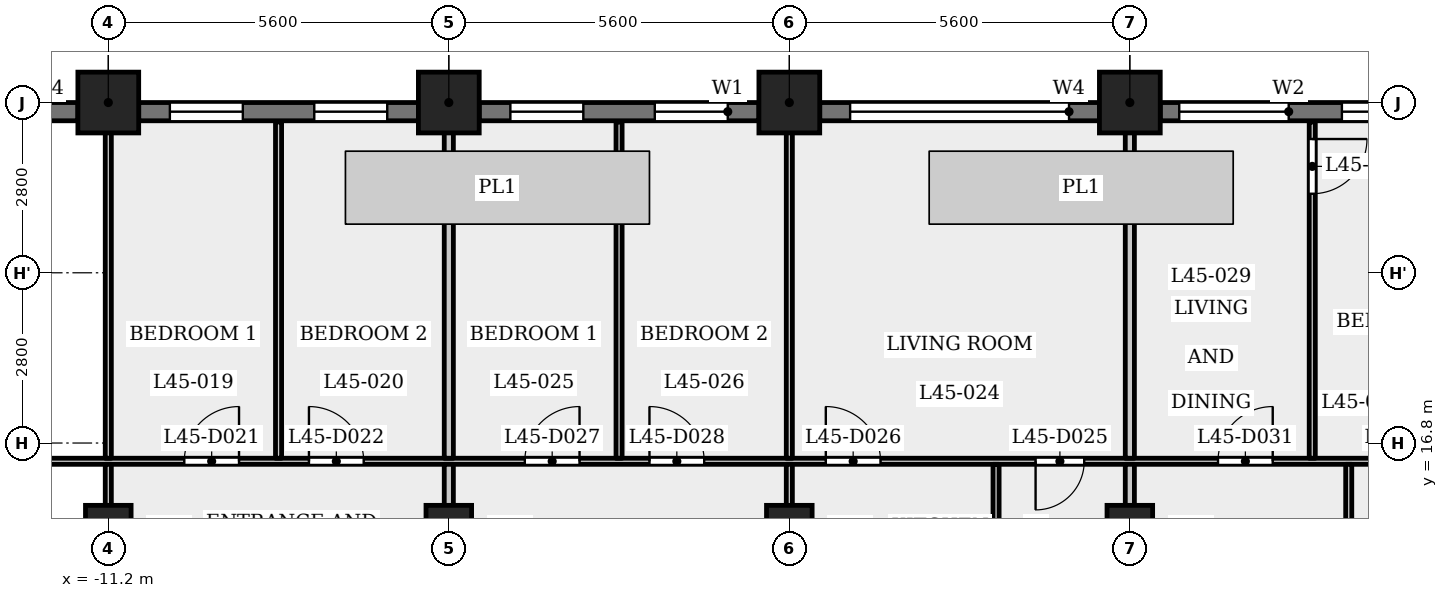
"""IFC4 building model, lengths in metres.
Left out: names, types, materials, properties, quantities, classifications, styles, units other than length and angle.
Written with IfcOpenShell. Run it as: python <this file> out.ifc"""

import sys

from ifc_helpers import new_model, si_unit, direction, frame, frame_2d, origin, origin_2d, place, context, subcontext, project, spatial, rectangle, extrude, element, fill, save


model = new_model("IFC4")
c1 = context("Model", 3, precision=1e-05, world=origin(), true_north=direction((0.0, 1.0)))
c2 = subcontext(c1, "Body", "Model", "MODEL_VIEW")
j1 = project(units=[si_unit("LENGTHUNIT", "METRE"), si_unit("PLANEANGLEUNIT", "RADIAN")], contexts=[c1])
p1 = place(None, origin())
s1 = spatial("IfcSite", under=j1, at=p1, CompositionType="ELEMENT")
p2 = place(p1, origin())
s2 = spatial("IfcBuilding", under=s1, at=p2, CompositionType="ELEMENT")
p3 = place(p2, frame((0.0, 0.0, 174.6)))
s3 = spatial("IfcBuildingStorey", under=s2, at=p3, CompositionType="ELEMENT", Elevation=174.6)
for number, where, z_axis, x_axis in (
    (1, (5.6, 22.4, 0.0), (0.0, 0.0, 1.0), (1.0, 0.0, 0.0)),
    (2, (0.0, 22.4, 0.0), (0.0, 0.0, 1.0), (1.0, 0.0, 0.0)),
    (3, (-5.6, 22.4, 0.0), (0.0, 0.0, 1.0), (1.0, 0.0, 0.0)),
    (4, (-11.2, 22.4, 0.0), (0.0, 0.0, 1.0), (1.0, 0.0, 0.0)),
):
    element("IfcColumn", number, at=place(p3, frame(where, z_axis=z_axis, x_axis=x_axis)), inside=s3, PredefinedType="COLUMN", context=c2, shape_type="SweptSolid", body=[
        extrude(rectangle(XDim=1.0, YDim=1.0, at=origin_2d()), origin(), (0.0, 0.0, 1.0), 3.5),
    ])
for number, where, z_axis, x_axis in (
    (5, (-11.2, 15.4, 0.0), (0.0, 0.0, 1.0), (1.0, 0.0, 0.0)),
    (6, (-5.6, 15.4, 0.0), (0.0, 0.0, 1.0), (1.0, 0.0, 0.0)),
    (7, (0.0, 15.4, 0.0), (0.0, 0.0, 1.0), (1.0, 0.0, 0.0)),
    (8, (5.6, 15.4, 0.0), (0.0, 0.0, 1.0), (1.0, 0.0, 0.0)),
):
    element("IfcColumn", number, at=place(p3, frame(where, z_axis=z_axis, x_axis=x_axis)), inside=s3, PredefinedType="COLUMN", context=c2, shape_type="SweptSolid", body=[
        extrude(rectangle(XDim=0.75, YDim=0.75, at=origin_2d()), origin(), (0.0, 0.0, 1.0), 3.5),
    ])
p4 = place(p3, frame((10.7, 22.25, 0.0), z_axis=(0.0, 0.0, 1.0), x_axis=(-1.0, 0.0, 0.0)))
e9 = element("IfcWall", 9, at=p4, inside=s3, PredefinedType="SOLIDWALL", context=c2, shape_type="SweptSolid", body=[
    extrude(rectangle(XDim=4.6, YDim=0.3, at=frame_2d((2.3, 0.0))), origin(), (0.0, 0.0, 1.0), 2.4),
])
p5 = place(p4, frame((0.413, 0.0, 0.6)))
e10 = element("IfcOpeningElement", 10, at=p5, cuts=e9, PredefinedType="OPENING", context=c2, shape_type="SweptSolid", body=[
    extrude(rectangle(XDim=1.2, YDim=1.55, at=frame_2d((0.6, 0.775))), frame((0.0, 0.16, 0.0), z_axis=(0.0, -1.0, 0.0), x_axis=(1.0, 0.0, 0.0)), (0.0, 0.0, 1.0), 0.32),
])
p6 = place(p4, frame((2.488, 0.0, 0.9)))
e11 = element("IfcOpeningElement", 11, at=p6, cuts=e9, PredefinedType="OPENING", context=c2, shape_type="SweptSolid", body=[
    extrude(rectangle(XDim=1.8, YDim=1.25, at=frame_2d((0.9, 0.625))), frame((0.0, 0.16, 0.0), z_axis=(0.0, -1.0, 0.0), x_axis=(1.0, 0.0, 0.0)), (0.0, 0.0, 1.0), 0.32),
])
p7 = place(p3, frame((5.1, 22.25, 0.0), z_axis=(0.0, 0.0, 1.0), x_axis=(-1.0, 0.0, 0.0)))
e12 = element("IfcWall", 12, at=p7, inside=s3, PredefinedType="SOLIDWALL", context=c2, shape_type="SweptSolid", body=[
    extrude(rectangle(XDim=4.6, YDim=0.3, at=frame_2d((2.3, 0.0))), origin(), (0.0, 0.0, 1.0), 2.4),
])
p8 = place(p7, frame((0.5, 0.0, 1.2)))
e13 = element("IfcOpeningElement", 13, at=p8, cuts=e12, PredefinedType="OPENING", context=c2, shape_type="SweptSolid", body=[
    extrude(rectangle(XDim=3.6, YDim=0.95, at=frame_2d((1.8, 0.475))), frame((0.0, 0.16, 0.0), z_axis=(0.0, -1.0, 0.0), x_axis=(1.0, 0.0, 0.0)), (0.0, 0.0, 1.0), 0.32),
])
p9 = place(p3, frame((-0.5, 22.25, 0.0), z_axis=(0.0, 0.0, 1.0), x_axis=(-1.0, 0.0, 0.0)))
e14 = element("IfcWall", 14, at=p9, inside=s3, PredefinedType="SOLIDWALL", context=c2, shape_type="SweptSolid", body=[
    extrude(rectangle(XDim=4.6, YDim=0.3, at=frame_2d((2.3, 0.0))), origin(), (0.0, 0.0, 1.0), 2.4),
])
p10 = place(p9, frame((0.512, 0.0, 0.6)))
e15 = element("IfcOpeningElement", 15, at=p10, cuts=e14, PredefinedType="OPENING", context=c2, shape_type="SweptSolid", body=[
    extrude(rectangle(XDim=1.2, YDim=1.55, at=frame_2d((0.6, 0.775))), frame((0.0, 0.16, 0.0), z_axis=(0.0, -1.0, 0.0), x_axis=(1.0, 0.0, 0.0)), (0.0, 0.0, 1.0), 0.32),
])
p11 = place(p9, frame((2.887, 0.0, 0.6)))
e16 = element("IfcOpeningElement", 16, at=p11, cuts=e14, PredefinedType="OPENING", context=c2, shape_type="SweptSolid", body=[
    extrude(rectangle(XDim=1.2, YDim=1.55, at=frame_2d((0.6, 0.775))), frame((0.0, 0.16, 0.0), z_axis=(0.0, -1.0, 0.0), x_axis=(1.0, 0.0, 0.0)), (0.0, 0.0, 1.0), 0.32),
])
p12 = place(p3, frame((-6.1, 22.25, 0.0), z_axis=(0.0, 0.0, 1.0), x_axis=(-1.0, 0.0, 0.0)))
e17 = element("IfcWall", 17, at=p12, inside=s3, PredefinedType="SOLIDWALL", context=c2, shape_type="SweptSolid", body=[
    extrude(rectangle(XDim=4.6, YDim=0.3, at=frame_2d((2.3, 0.0))), origin(), (0.0, 0.0, 1.0), 2.4),
])
p13 = place(p12, frame((0.512, 0.0, 0.6)))
e18 = element("IfcOpeningElement", 18, at=p13, cuts=e17, PredefinedType="OPENING", context=c2, shape_type="SweptSolid", body=[
    extrude(rectangle(XDim=1.2, YDim=1.55, at=frame_2d((0.6, 0.775))), frame((0.0, 0.16, 0.0), z_axis=(0.0, -1.0, 0.0), x_axis=(1.0, 0.0, 0.0)), (0.0, 0.0, 1.0), 0.32),
])
p14 = place(p12, frame((2.887, 0.0, 0.6)))
e19 = element("IfcOpeningElement", 19, at=p14, cuts=e17, PredefinedType="OPENING", context=c2, shape_type="SweptSolid", body=[
    extrude(rectangle(XDim=1.2, YDim=1.55, at=frame_2d((0.6, 0.775))), frame((0.0, 0.16, 0.0), z_axis=(0.0, -1.0, 0.0), x_axis=(1.0, 0.0, 0.0)), (0.0, 0.0, 1.0), 0.32),
])
p15 = place(p3, frame((-11.7, 22.25, 0.0), z_axis=(0.0, 0.0, 1.0), x_axis=(-1.0, 0.0, 0.0)))
e20 = element("IfcWall", 20, at=p15, inside=s3, PredefinedType="SOLIDWALL", context=c2, shape_type="SweptSolid", body=[
    extrude(rectangle(XDim=4.6, YDim=0.3, at=frame_2d((2.3, 0.0))), origin(), (0.0, 0.0, 1.0), 2.4),
])
p16 = place(p15, frame((0.5, 0.0, 1.2)))
e21 = element("IfcOpeningElement", 21, at=p16, cuts=e20, PredefinedType="OPENING", context=c2, shape_type="SweptSolid", body=[
    extrude(rectangle(XDim=3.6, YDim=0.95, at=frame_2d((1.8, 0.475))), frame((0.0, 0.16, 0.0), z_axis=(0.0, -1.0, 0.0), x_axis=(1.0, 0.0, 0.0)), (0.0, 0.0, 1.0), 0.32),
])
p17 = place(p3, frame((-16.725, 16.5, 0.0), z_axis=(0.0, 0.0, 1.0), x_axis=(1.0, 0.0, 0.0)))
e22 = element("IfcWall", 22, at=p17, inside=s3, PredefinedType="PARTITIONING", context=c2, shape_type="SweptSolid", body=[
    extrude(rectangle(XDim=33.45, YDim=0.1, at=frame_2d((16.725, 0.0))), origin(), (0.0, 0.0, 1.0), 3.15),
])
p18 = place(p17, frame((0.575, 0.0, 0.0)))
e23 = element("IfcOpeningElement", 23, at=p18, cuts=e22, PredefinedType="OPENING", context=c2, shape_type="SweptSolid", body=[
    extrude(rectangle(XDim=0.8, YDim=2.1, at=frame_2d((0.4, 1.05))), frame((0.0, 0.06, 0.0), z_axis=(0.0, -1.0, 0.0), x_axis=(1.0, 0.0, 0.0)), (0.0, 0.0, 1.0), 0.12),
])
p19 = place(p17, frame((3.225, 0.0, 0.0)))
e24 = element("IfcOpeningElement", 24, at=p19, cuts=e22, PredefinedType="OPENING", context=c2, shape_type="SweptSolid", body=[
    extrude(rectangle(XDim=0.9, YDim=2.1, at=frame_2d((0.45, 1.05))), frame((0.0, 0.06, 0.0), z_axis=(0.0, -1.0, 0.0), x_axis=(1.0, 0.0, 0.0)), (0.0, 0.0, 1.0), 0.12),
])
p20 = place(p17, frame((6.775, 0.0, 0.0)))
e25 = element("IfcOpeningElement", 25, at=p20, cuts=e22, PredefinedType="OPENING", context=c2, shape_type="SweptSolid", body=[
    extrude(rectangle(XDim=0.9, YDim=2.1, at=frame_2d((0.45, 1.05))), frame((0.0, 0.06, 0.0), z_axis=(0.0, -1.0, 0.0), x_axis=(1.0, 0.0, 0.0)), (0.0, 0.0, 1.0), 0.12),
])
p21 = place(p17, frame((8.825, 0.0, 0.0)))
e26 = element("IfcOpeningElement", 26, at=p21, cuts=e22, PredefinedType="OPENING", context=c2, shape_type="SweptSolid", body=[
    extrude(rectangle(XDim=0.9, YDim=2.1, at=frame_2d((0.45, 1.05))), frame((0.0, 0.06, 0.0), z_axis=(0.0, -1.0, 0.0), x_axis=(1.0, 0.0, 0.0)), (0.0, 0.0, 1.0), 0.12),
])
p22 = place(p17, frame((20.775, 0.0, 0.0)))
e27 = element("IfcOpeningElement", 27, at=p22, cuts=e22, PredefinedType="OPENING", context=c2, shape_type="SweptSolid", body=[
    extrude(rectangle(XDim=0.8, YDim=2.1, at=frame_2d((0.4, 1.05))), frame((0.0, 0.06, 0.0), z_axis=(0.0, -1.0, 0.0), x_axis=(1.0, 0.0, 0.0)), (0.0, 0.0, 1.0), 0.12),
])
p23 = place(p17, frame((17.325, 0.0, 0.0)))
e28 = element("IfcOpeningElement", 28, at=p23, cuts=e22, PredefinedType="OPENING", context=c2, shape_type="SweptSolid", body=[
    extrude(rectangle(XDim=0.9, YDim=2.1, at=frame_2d((0.45, 1.05))), frame((0.0, 0.06, 0.0), z_axis=(0.0, -1.0, 0.0), x_axis=(1.0, 0.0, 0.0)), (0.0, 0.0, 1.0), 0.12),
])
p24 = place(p17, frame((12.375, 0.0, 0.0)))
e29 = element("IfcOpeningElement", 29, at=p24, cuts=e22, PredefinedType="OPENING", context=c2, shape_type="SweptSolid", body=[
    extrude(rectangle(XDim=0.9, YDim=2.1, at=frame_2d((0.45, 1.05))), frame((0.0, 0.06, 0.0), z_axis=(0.0, -1.0, 0.0), x_axis=(1.0, 0.0, 0.0)), (0.0, 0.0, 1.0), 0.12),
])
p25 = place(p17, frame((14.425, 0.0, 0.0)))
e30 = element("IfcOpeningElement", 30, at=p25, cuts=e22, PredefinedType="OPENING", context=c2, shape_type="SweptSolid", body=[
    extrude(rectangle(XDim=0.9, YDim=2.1, at=frame_2d((0.45, 1.05))), frame((0.0, 0.06, 0.0), z_axis=(0.0, -1.0, 0.0), x_axis=(1.0, 0.0, 0.0)), (0.0, 0.0, 1.0), 0.12),
])
p26 = place(p17, frame((26.575, 0.0, 0.0)))
e31 = element("IfcOpeningElement", 31, at=p26, cuts=e22, PredefinedType="OPENING", context=c2, shape_type="SweptSolid", body=[
    extrude(rectangle(XDim=0.8, YDim=2.1, at=frame_2d((0.4, 1.05))), frame((0.0, 0.06, 0.0), z_axis=(0.0, -1.0, 0.0), x_axis=(1.0, 0.0, 0.0)), (0.0, 0.0, 1.0), 0.12),
])
p27 = place(p17, frame((23.775, 0.0, 0.0)))
e32 = element("IfcOpeningElement", 32, at=p27, cuts=e22, PredefinedType="OPENING", context=c2, shape_type="SweptSolid", body=[
    extrude(rectangle(XDim=0.9, YDim=2.1, at=frame_2d((0.45, 1.05))), frame((0.0, 0.06, 0.0), z_axis=(0.0, -1.0, 0.0), x_axis=(1.0, 0.0, 0.0)), (0.0, 0.0, 1.0), 0.12),
])
p28 = place(p17, frame((32.075, 0.0, 0.0)))
e33 = element("IfcOpeningElement", 33, at=p28, cuts=e22, PredefinedType="OPENING", context=c2, shape_type="SweptSolid", body=[
    extrude(rectangle(XDim=0.8, YDim=2.1, at=frame_2d((0.4, 1.05))), frame((0.0, 0.06, 0.0), z_axis=(0.0, -1.0, 0.0), x_axis=(1.0, 0.0, 0.0)), (0.0, 0.0, 1.0), 0.12),
])
p29 = place(p17, frame((29.375, 0.0, 0.0)))
e34 = element("IfcOpeningElement", 34, at=p29, cuts=e22, PredefinedType="OPENING", context=c2, shape_type="SweptSolid", body=[
    extrude(rectangle(XDim=0.9, YDim=2.1, at=frame_2d((0.45, 1.05))), frame((0.0, 0.06, 0.0), z_axis=(0.0, -1.0, 0.0), x_axis=(1.0, 0.0, 0.0)), (0.0, 0.0, 1.0), 0.12),
])
p30 = place(p3, frame((-11.2, 13.275, 0.0), z_axis=(0.0, 0.0, 1.0), x_axis=(0.0, 1.0, 0.0)))
e35 = element("IfcWall", 35, at=p30, inside=s3, PredefinedType="PARTITIONING", context=c2, shape_type="SweptSolid", body=[
    extrude(rectangle(XDim=3.175, YDim=0.1, at=frame_2d((1.587, 0.0))), origin(), (0.0, 0.0, 1.0), 3.15),
])
p31 = place(p30, frame((0.425, 0.0, 0.0)))
e36 = element("IfcOpeningElement", 36, at=p31, cuts=e35, PredefinedType="OPENING", context=c2, shape_type="SweptSolid", body=[
    extrude(rectangle(XDim=0.9, YDim=2.1, at=frame_2d((0.45, 1.05))), frame((0.0, 0.06, 0.0), z_axis=(0.0, -1.0, 0.0), x_axis=(1.0, 0.0, 0.0)), (0.0, 0.0, 1.0), 0.12),
])
p32 = place(p3, frame((-11.2, 16.55, 0.0), z_axis=(0.0, 0.0, 1.0), x_axis=(0.0, 1.0, 0.0)))
e37 = element("IfcWall", 37, at=p32, inside=s3, PredefinedType="PARTITIONING", context=c2, shape_type="SweptSolid", body=[
    extrude(rectangle(XDim=6.33, YDim=0.1, at=frame_2d((3.165, 0.0))), origin(), (0.0, 0.0, 1.0), 3.15),
])
p33 = place(p3, frame((-8.4, 16.55, 0.0), z_axis=(0.0, 0.0, 1.0), x_axis=(0.0, 1.0, 0.0)))
e38 = element("IfcWall", 38, at=p33, inside=s3, PredefinedType="PARTITIONING", context=c2, shape_type="SweptSolid", body=[
    extrude(rectangle(XDim=5.53, YDim=0.1, at=frame_2d((2.765, 0.0))), origin(), (0.0, 0.0, 1.0), 3.15),
])
p34 = place(p3, frame((-5.6, 13.275, 0.0), z_axis=(0.0, 0.0, 1.0), x_axis=(0.0, 1.0, 0.0)))
e39 = element("IfcWall", 39, at=p34, inside=s3, PredefinedType="PARTITIONING", context=c2, shape_type="SweptSolid", body=[
    extrude(rectangle(XDim=3.175, YDim=0.15, at=frame_2d((1.587, 0.0))), origin(), (0.0, 0.0, 1.0), 3.15),
])
p35 = place(p3, frame((-5.6, 16.55, 0.0), z_axis=(0.0, 0.0, 1.0), x_axis=(0.0, 1.0, 0.0)))
e40 = element("IfcWall", 40, at=p35, inside=s3, PredefinedType="PARTITIONING", context=c2, shape_type="SweptSolid", body=[
    extrude(rectangle(XDim=6.33, YDim=0.15, at=frame_2d((3.165, 0.0))), origin(), (0.0, 0.0, 1.0), 3.15),
])
p36 = place(p3, frame((-2.8, 16.55, 0.0), z_axis=(0.0, 0.0, 1.0), x_axis=(0.0, 1.0, 0.0)))
e41 = element("IfcWall", 41, at=p36, inside=s3, PredefinedType="PARTITIONING", context=c2, shape_type="SweptSolid", body=[
    extrude(rectangle(XDim=5.53, YDim=0.1, at=frame_2d((2.765, 0.0))), origin(), (0.0, 0.0, 1.0), 3.15),
])
p37 = place(p3, frame((0.0, 13.275, 0.0), z_axis=(0.0, 0.0, 1.0), x_axis=(0.0, 1.0, 0.0)))
e42 = element("IfcWall", 42, at=p37, inside=s3, PredefinedType="PARTITIONING", context=c2, shape_type="SweptSolid", body=[
    extrude(rectangle(XDim=3.175, YDim=0.1, at=frame_2d((1.587, 0.0))), origin(), (0.0, 0.0, 1.0), 3.15),
])
p38 = place(p37, frame((0.576, 0.0, 0.0)))
e43 = element("IfcOpeningElement", 43, at=p38, cuts=e42, PredefinedType="OPENING", context=c2, shape_type="SweptSolid", body=[
    extrude(rectangle(XDim=0.9, YDim=2.1, at=frame_2d((0.45, 1.05))), frame((0.0, 0.06, 0.0), z_axis=(0.0, -1.0, 0.0), x_axis=(1.0, 0.0, 0.0)), (0.0, 0.0, 1.0), 0.12),
])
p39 = place(p3, frame((0.0, 16.55, 0.0), z_axis=(0.0, 0.0, 1.0), x_axis=(0.0, 1.0, 0.0)))
e44 = element("IfcWall", 44, at=p39, inside=s3, PredefinedType="PARTITIONING", context=c2, shape_type="SweptSolid", body=[
    extrude(rectangle(XDim=6.33, YDim=0.1, at=frame_2d((3.165, 0.0))), origin(), (0.0, 0.0, 1.0), 3.15),
])
p40 = place(p3, frame((3.4, 13.275, 0.0), z_axis=(0.0, 0.0, 1.0), x_axis=(0.0, 1.0, 0.0)))
e45 = element("IfcWall", 45, at=p40, inside=s3, PredefinedType="PARTITIONING", context=c2, shape_type="SweptSolid", body=[
    extrude(rectangle(XDim=3.175, YDim=0.1, at=frame_2d((1.587, 0.0))), origin(), (0.0, 0.0, 1.0), 3.15),
])
p41 = place(p3, frame((5.6, 13.275, 0.0), z_axis=(0.0, 0.0, 1.0), x_axis=(0.0, 1.0, 0.0)))
e46 = element("IfcWall", 46, at=p41, inside=s3, PredefinedType="PARTITIONING", context=c2, shape_type="SweptSolid", body=[
    extrude(rectangle(XDim=3.175, YDim=0.15, at=frame_2d((1.587, 0.0))), origin(), (0.0, 0.0, 1.0), 3.15),
])
p42 = place(p3, frame((5.6, 16.55, 0.0), z_axis=(0.0, 0.0, 1.0), x_axis=(0.0, 1.0, 0.0)))
e47 = element("IfcWall", 47, at=p42, inside=s3, PredefinedType="PARTITIONING", context=c2, shape_type="SweptSolid", body=[
    extrude(rectangle(XDim=6.33, YDim=0.15, at=frame_2d((3.165, 0.0))), origin(), (0.0, 0.0, 1.0), 3.15),
])
p43 = place(p3, frame((8.6, 16.55, 0.0), z_axis=(0.0, 0.0, 1.0), x_axis=(0.0, 1.0, 0.0)))
e48 = element("IfcWall", 48, at=p43, inside=s3, PredefinedType="PARTITIONING", context=c2, shape_type="SweptSolid", body=[
    extrude(rectangle(XDim=5.53, YDim=0.1, at=frame_2d((2.765, 0.0))), origin(), (0.0, 0.0, 1.0), 3.15),
])
p44 = place(p43, frame((4.35, 0.0, 0.0)))
e49 = element("IfcOpeningElement", 49, at=p44, cuts=e48, PredefinedType="OPENING", context=c2, shape_type="SweptSolid", body=[
    extrude(rectangle(XDim=0.9, YDim=2.1, at=frame_2d((0.45, 1.05))), frame((0.0, 0.06, 0.0), z_axis=(0.0, -1.0, 0.0), x_axis=(1.0, 0.0, 0.0)), (0.0, 0.0, 1.0), 0.12),
])
p45 = place(p3, frame((9.2, 13.275, 0.0), z_axis=(0.0, 0.0, 1.0), x_axis=(0.0, 1.0, 0.0)))
e50 = element("IfcWall", 50, at=p45, inside=s3, PredefinedType="PARTITIONING", context=c2, shape_type="SweptSolid", body=[
    extrude(rectangle(XDim=3.175, YDim=0.1, at=frame_2d((1.587, 0.0))), origin(), (0.0, 0.0, 1.0), 3.15),
])
p46 = place(p20, origin())
e51 = element("IfcDoor", 51, at=p46, inside=s3, OperationType="SINGLE_SWING_LEFT", PredefinedType="DOOR", context=c2, shape_type="SweptSolid", body=[
    extrude(rectangle(XDim=0.9, YDim=2.1, at=frame_2d((0.45, 1.05))), frame((0.0, 0.025, 0.0), z_axis=(0.0, -1.0, 0.0), x_axis=(1.0, 0.0, 0.0)), (0.0, 0.0, 1.0), 0.05),
])
fill(e25, e51)
p47 = place(p21, origin())
e52 = element("IfcDoor", 52, at=p47, inside=s3, OperationType="SINGLE_SWING_RIGHT", PredefinedType="DOOR", context=c2, shape_type="SweptSolid", body=[
    extrude(rectangle(XDim=0.9, YDim=2.1, at=frame_2d((0.45, 1.05))), frame((0.0, 0.025, 0.0), z_axis=(0.0, -1.0, 0.0), x_axis=(1.0, 0.0, 0.0)), (0.0, 0.0, 1.0), 0.05),
])
fill(e26, e52)
p48 = place(p22, origin())
e53 = element("IfcDoor", 53, at=p48, inside=s3, OperationType="SINGLE_SWING_LEFT", PredefinedType="DOOR", context=c2, shape_type="SweptSolid", body=[
    extrude(rectangle(XDim=0.8, YDim=2.1, at=frame_2d((0.4, 1.05))), frame((0.0, 0.025, 0.0), z_axis=(0.0, -1.0, 0.0), x_axis=(1.0, 0.0, 0.0)), (0.0, 0.0, 1.0), 0.05),
])
fill(e27, e53)
p49 = place(p23, origin())
e54 = element("IfcDoor", 54, at=p49, inside=s3, OperationType="SINGLE_SWING_RIGHT", PredefinedType="DOOR", context=c2, shape_type="SweptSolid", body=[
    extrude(rectangle(XDim=0.9, YDim=2.1, at=frame_2d((0.45, 1.05))), frame((0.0, 0.025, 0.0), z_axis=(0.0, -1.0, 0.0), x_axis=(1.0, 0.0, 0.0)), (0.0, 0.0, 1.0), 0.05),
])
fill(e28, e54)
p50 = place(p24, origin())
e55 = element("IfcDoor", 55, at=p50, inside=s3, OperationType="SINGLE_SWING_LEFT", PredefinedType="DOOR", context=c2, shape_type="SweptSolid", body=[
    extrude(rectangle(XDim=0.9, YDim=2.1, at=frame_2d((0.45, 1.05))), frame((0.0, 0.025, 0.0), z_axis=(0.0, -1.0, 0.0), x_axis=(1.0, 0.0, 0.0)), (0.0, 0.0, 1.0), 0.05),
])
fill(e29, e55)
p51 = place(p25, origin())
e56 = element("IfcDoor", 56, at=p51, inside=s3, OperationType="SINGLE_SWING_RIGHT", PredefinedType="DOOR", context=c2, shape_type="SweptSolid", body=[
    extrude(rectangle(XDim=0.9, YDim=2.1, at=frame_2d((0.45, 1.05))), frame((0.0, 0.025, 0.0), z_axis=(0.0, -1.0, 0.0), x_axis=(1.0, 0.0, 0.0)), (0.0, 0.0, 1.0), 0.05),
])
fill(e30, e56)
p52 = place(p27, origin())
e57 = element("IfcDoor", 57, at=p52, inside=s3, OperationType="SINGLE_SWING_LEFT", PredefinedType="DOOR", context=c2, shape_type="SweptSolid", body=[
    extrude(rectangle(XDim=0.9, YDim=2.1, at=frame_2d((0.45, 1.05))), frame((0.0, 0.025, 0.0), z_axis=(0.0, -1.0, 0.0), x_axis=(1.0, 0.0, 0.0)), (0.0, 0.0, 1.0), 0.05),
])
fill(e32, e57)
p53 = place(p44, origin())
e58 = element("IfcDoor", 58, at=p53, inside=s3, OperationType="SINGLE_SWING_RIGHT", PredefinedType="DOOR", context=c2, shape_type="SweptSolid", body=[
    extrude(rectangle(XDim=0.9, YDim=2.1, at=frame_2d((0.45, 1.05))), frame((0.0, 0.025, 0.0), z_axis=(0.0, -1.0, 0.0), x_axis=(1.0, 0.0, 0.0)), (0.0, 0.0, 1.0), 0.05),
])
fill(e49, e58)
p54 = place(p5, origin())
e59 = element("IfcWindow", 59, at=p54, inside=s3, PartitioningType="SINGLE_PANEL", PredefinedType="WINDOW", context=c2, shape_type="SweptSolid", body=[
    extrude(rectangle(XDim=1.2, YDim=1.55, at=frame_2d((0.6, 0.775))), frame((0.0, 0.03, 0.0), z_axis=(0.0, -1.0, 0.0), x_axis=(1.0, 0.0, 0.0)), (0.0, 0.0, 1.0), 0.06),
])
fill(e10, e59)
p55 = place(p6, origin())
e60 = element("IfcWindow", 60, at=p55, inside=s3, PartitioningType="SINGLE_PANEL", PredefinedType="WINDOW", context=c2, shape_type="SweptSolid", body=[
    extrude(rectangle(XDim=1.8, YDim=1.25, at=frame_2d((0.9, 0.625))), frame((0.0, 0.03, 0.0), z_axis=(0.0, -1.0, 0.0), x_axis=(1.0, 0.0, 0.0)), (0.0, 0.0, 1.0), 0.06),
])
fill(e11, e60)
p56 = place(p8, origin())
e61 = element("IfcWindow", 61, at=p56, inside=s3, PartitioningType="SINGLE_PANEL", PredefinedType="WINDOW", context=c2, shape_type="SweptSolid", body=[
    extrude(rectangle(XDim=3.6, YDim=0.95, at=frame_2d((1.8, 0.475))), frame((0.0, 0.03, 0.0), z_axis=(0.0, -1.0, 0.0), x_axis=(1.0, 0.0, 0.0)), (0.0, 0.0, 1.0), 0.06),
])
fill(e13, e61)
p57 = place(p10, origin())
e62 = element("IfcWindow", 62, at=p57, inside=s3, PartitioningType="SINGLE_PANEL", PredefinedType="WINDOW", context=c2, shape_type="SweptSolid", body=[
    extrude(rectangle(XDim=1.2, YDim=1.55, at=frame_2d((0.6, 0.775))), frame((0.0, 0.03, 0.0), z_axis=(0.0, -1.0, 0.0), x_axis=(1.0, 0.0, 0.0)), (0.0, 0.0, 1.0), 0.06),
])
fill(e15, e62)
p58 = place(p11, origin())
e63 = element("IfcWindow", 63, at=p58, inside=s3, PartitioningType="SINGLE_PANEL", PredefinedType="WINDOW", context=c2, shape_type="SweptSolid", body=[
    extrude(rectangle(XDim=1.2, YDim=1.55, at=frame_2d((0.6, 0.775))), frame((0.0, 0.03, 0.0), z_axis=(0.0, -1.0, 0.0), x_axis=(1.0, 0.0, 0.0)), (0.0, 0.0, 1.0), 0.06),
])
fill(e16, e63)
p59 = place(p13, origin())
e64 = element("IfcWindow", 64, at=p59, inside=s3, PartitioningType="SINGLE_PANEL", PredefinedType="WINDOW", context=c2, shape_type="SweptSolid", body=[
    extrude(rectangle(XDim=1.2, YDim=1.55, at=frame_2d((0.6, 0.775))), frame((0.0, 0.03, 0.0), z_axis=(0.0, -1.0, 0.0), x_axis=(1.0, 0.0, 0.0)), (0.0, 0.0, 1.0), 0.06),
])
fill(e18, e64)
p60 = place(p14, origin())
e65 = element("IfcWindow", 65, at=p60, inside=s3, PartitioningType="SINGLE_PANEL", PredefinedType="WINDOW", context=c2, shape_type="SweptSolid", body=[
    extrude(rectangle(XDim=1.2, YDim=1.55, at=frame_2d((0.6, 0.775))), frame((0.0, 0.03, 0.0), z_axis=(0.0, -1.0, 0.0), x_axis=(1.0, 0.0, 0.0)), (0.0, 0.0, 1.0), 0.06),
])
fill(e19, e65)
save(model, sys.argv[1])
